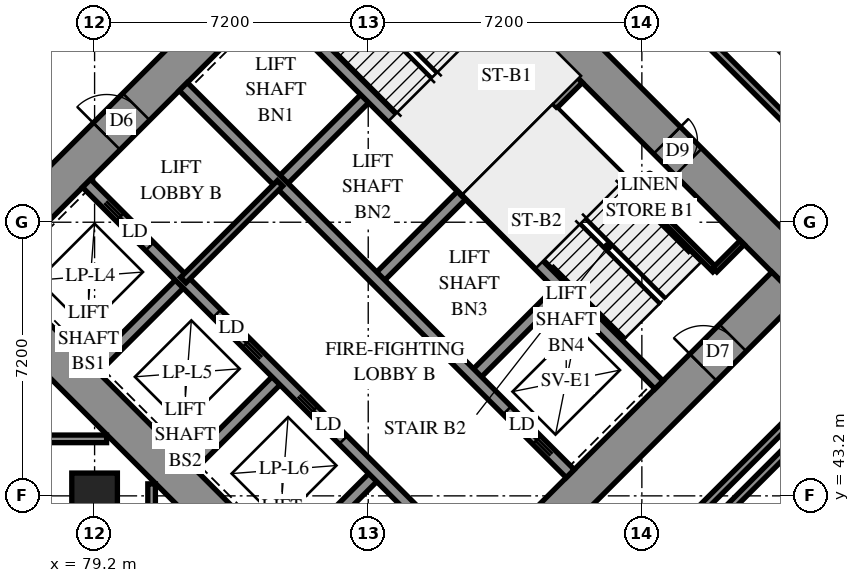
"""IFC4 building model, lengths in metres.
Left out: names, types, materials, properties, quantities, classifications, styles, units other than length and angle.
Written with IfcOpenShell. Run it as: python <this file> out.ifc"""

import sys

from ifc_helpers import new_model, si_unit, direction, frame, frame_2d, origin, origin_2d, place, context, subcontext, project, spatial, polyline, rectangle, outline, extrude, element, fill, save


model = new_model("IFC4")
c1 = context("Model", 3, precision=1e-05, world=origin(), true_north=direction((0.0, 1.0)))
c2 = subcontext(c1, "Body", "Model", "MODEL_VIEW")
j1 = project(units=[si_unit("LENGTHUNIT", "METRE"), si_unit("PLANEANGLEUNIT", "RADIAN")], contexts=[c1])
p1 = place(None, origin())
s1 = spatial("IfcSite", under=j1, at=p1, CompositionType="ELEMENT")
p2 = place(p1, origin())
s2 = spatial("IfcBuilding", under=s1, at=p2, CompositionType="ELEMENT")
p3 = place(p2, frame((0.0, 0.0, 10.2)))
s3 = spatial("IfcBuildingStorey", under=s2, at=p3, CompositionType="ELEMENT", Elevation=10.2)
p4 = place(p3, frame((79.2, 43.2, 0.0), z_axis=(0.0, 0.0, 1.0), x_axis=(1.0, 0.0, 0.0)))
e1 = element("IfcColumn", 1, at=p4, inside=s3, PredefinedType="COLUMN", context=c2, shape_type="SweptSolid", body=[
    extrude(rectangle(XDim=1.2, YDim=1.2, at=origin_2d()), origin(), (0.0, 0.0, 1.0), 3.8),
])
p5 = place(p3, frame((75.594, 49.443, -0.4), z_axis=(0.0, 0.0, 1.0), x_axis=(0.7071037324, -0.70710983, 0.0)))
e2 = element("IfcWall", 2, at=p5, inside=s3, PredefinedType="SHEAR", context=c2, shape_type="SweptSolid", body=[
    extrude(rectangle(XDim=16.4, YDim=1.0, at=frame_2d((8.2, 0.0))), origin(), (0.0, 0.0, 1.0), 3.5),
])
p6 = place(p3, frame((86.483, 60.333, -0.4), z_axis=(0.0, 0.0, 1.0), x_axis=(0.70710983, -0.7071037324, 0.0)))
e3 = element("IfcWall", 3, at=p6, inside=s3, PredefinedType="SHEAR", context=c2, shape_type="SweptSolid", body=[
    extrude(rectangle(XDim=16.4, YDim=1.0, at=frame_2d((8.2, 0.0))), origin(), (0.0, 0.0, 1.0), 3.5),
])
p7 = place(p6, frame((11.0, 0.0, 0.4)))
e4 = element("IfcOpeningElement", 4, at=p7, cuts=e3, PredefinedType="OPENING", context=c2, shape_type="SweptSolid", body=[
    extrude(rectangle(XDim=0.8, YDim=2.1, at=frame_2d((0.4, 1.05))), frame((0.0, 0.51, 0.0), z_axis=(0.0, -1.0, 0.0), x_axis=(1.0, 0.0, 0.0)), (0.0, 0.0, 1.0), 1.02),
])
p8 = place(p3, frame((76.301, 49.443, -0.4), z_axis=(0.0, 0.0, 1.0), x_axis=(0.7071067812, 0.7071067812, 0.0)))
e5 = element("IfcWall", 5, at=p8, inside=s3, PredefinedType="SHEAR", context=c2, shape_type="SweptSolid", body=[
    extrude(rectangle(XDim=14.4, YDim=1.0, at=frame_2d((7.2, 0.0))), origin(), (0.0, 0.0, 1.0), 3.5),
])
p9 = place(p8, frame((4.55, 0.0, 0.4)))
e6 = element("IfcOpeningElement", 6, at=p9, cuts=e5, PredefinedType="OPENING", context=c2, shape_type="SweptSolid", body=[
    extrude(rectangle(XDim=1.1, YDim=2.1, at=frame_2d((0.55, 1.05))), frame((0.0, 0.51, 0.0), z_axis=(0.0, -1.0, 0.0), x_axis=(1.0, 0.0, 0.0)), (0.0, 0.0, 1.0), 1.02),
])
p10 = place(p8, frame((11.35, 0.0, 0.4)))
e7 = element("IfcOpeningElement", 7, at=p10, cuts=e5, PredefinedType="OPENING", context=c2, shape_type="SweptSolid", body=[
    extrude(rectangle(XDim=1.1, YDim=2.1, at=frame_2d((0.55, 1.05))), frame((0.0, 0.51, 0.0), z_axis=(0.0, -1.0, 0.0), x_axis=(1.0, 0.0, 0.0)), (0.0, 0.0, 1.0), 1.02),
])
p11 = place(p3, frame((87.19, 38.554, -0.4), z_axis=(0.0, 0.0, 1.0), x_axis=(0.707103309, 0.7071102534, 0.0)))
e8 = element("IfcWall", 8, at=p11, inside=s3, PredefinedType="SHEAR", context=c2, shape_type="SweptSolid", body=[
    extrude(rectangle(XDim=14.4, YDim=1.0, at=frame_2d((7.2, 0.0))), origin(), (0.0, 0.0, 1.0), 3.5),
])
p12 = place(p11, frame((4.55, 0.0, 0.4)))
e9 = element("IfcOpeningElement", 9, at=p12, cuts=e8, PredefinedType="OPENING", context=c2, shape_type="SweptSolid", body=[
    extrude(rectangle(XDim=1.1, YDim=2.1, at=frame_2d((0.55, 1.05))), frame((0.0, 0.51, 0.0), z_axis=(0.0, -1.0, 0.0), x_axis=(1.0, 0.0, 0.0)), (0.0, 0.0, 1.0), 1.02),
])
p13 = place(p11, frame((11.35, 0.0, 0.4)))
e10 = element("IfcOpeningElement", 10, at=p13, cuts=e8, PredefinedType="OPENING", context=c2, shape_type="SweptSolid", body=[
    extrude(rectangle(XDim=1.1, YDim=2.1, at=frame_2d((0.55, 1.05))), frame((0.0, 0.51, 0.0), z_axis=(0.0, -1.0, 0.0), x_axis=(1.0, 0.0, 0.0)), (0.0, 0.0, 1.0), 1.02),
])
for number, where, z_axis, x_axis in (
    (11, (79.2, 46.544, 0.0), (0.0, 0.0, 1.0), (0.707, 0.707, 0.0)),
    (12, (84.079, 51.423, 0.0), (0.0, 0.0, 1.0), (0.707, 0.707, 0.0)),
):
    element("IfcWall", number, at=place(p3, frame(where, z_axis=z_axis, x_axis=x_axis)), inside=s3, PredefinedType="SOLIDWALL", context=c2, shape_type="SweptSolid", body=[
        extrude(rectangle(XDim=3.3, YDim=0.3, at=frame_2d((1.65, 0.0))), origin(), (0.0, 0.0, 1.0), 3.8),
    ])
p14 = place(p3, frame((81.746, 43.999, 0.0), z_axis=(0.0, 0.0, 1.0), x_axis=(0.7071067812, 0.7071067812, 0.0)))
e13 = element("IfcWall", 13, at=p14, inside=s3, PredefinedType="SOLIDWALL", context=c2, shape_type="SweptSolid", body=[
    extrude(rectangle(XDim=3.3, YDim=0.3, at=frame_2d((1.65, 0.0))), origin(), (0.0, 0.0, 1.0), 3.8),
])
p15 = place(p3, frame((86.625, 48.878, 0.0), z_axis=(0.0, 0.0, 1.0), x_axis=(0.7071067812, 0.7071067812, 0.0)))
e14 = element("IfcWall", 14, at=p15, inside=s3, PredefinedType="SOLIDWALL", context=c2, shape_type="SweptSolid", body=[
    extrude(rectangle(XDim=3.3, YDim=0.3, at=frame_2d((1.65, 0.0))), origin(), (0.0, 0.0, 1.0), 3.8),
])
p16 = place(p3, frame((84.291, 41.453, 0.0), z_axis=(0.0, 0.0, 1.0), x_axis=(0.7071067812, 0.7071067812, 0.0)))
e15 = element("IfcWall", 15, at=p16, inside=s3, PredefinedType="SOLIDWALL", context=c2, shape_type="SweptSolid", body=[
    extrude(rectangle(XDim=3.3, YDim=0.3, at=frame_2d((1.65, 0.0))), origin(), (0.0, 0.0, 1.0), 3.8),
])
p17 = place(p3, frame((89.17, 46.332, 0.0), z_axis=(0.0, 0.0, 1.0), x_axis=(0.7071067812, 0.7071067812, 0.0)))
e16 = element("IfcWall", 16, at=p17, inside=s3, PredefinedType="SOLIDWALL", context=c2, shape_type="SweptSolid", body=[
    extrude(rectangle(XDim=3.3, YDim=0.3, at=frame_2d((1.65, 0.0))), origin(), (0.0, 0.0, 1.0), 3.8),
])
p18 = place(p3, frame((78.988, 51.423, 0.0), z_axis=(0.0, 0.0, 1.0), x_axis=(0.7071067812, -0.7071067812, 0.0)))
e17 = element("IfcWall", 17, at=p18, inside=s3, PredefinedType="SOLIDWALL", context=c2, shape_type="SweptSolid", body=[
    extrude(rectangle(XDim=14.4, YDim=0.3, at=frame_2d((7.2, 0.0))), origin(), (0.0, 0.0, 1.0), 3.8),
])
p19 = place(p18, frame((1.25, 0.0, 0.0)))
e18 = element("IfcOpeningElement", 18, at=p19, cuts=e17, PredefinedType="OPENING", context=c2, shape_type="SweptSolid", body=[
    extrude(rectangle(XDim=1.1, YDim=2.1, at=frame_2d((0.55, 1.05))), frame((0.0, 0.16, 0.0), z_axis=(0.0, -1.0, 0.0), x_axis=(1.0, 0.0, 0.0)), (0.0, 0.0, 1.0), 0.32),
])
p20 = place(p18, frame((4.85, 0.0, 0.0)))
e19 = element("IfcOpeningElement", 19, at=p20, cuts=e17, PredefinedType="OPENING", context=c2, shape_type="SweptSolid", body=[
    extrude(rectangle(XDim=1.1, YDim=2.1, at=frame_2d((0.55, 1.05))), frame((0.0, 0.16, 0.0), z_axis=(0.0, -1.0, 0.0), x_axis=(1.0, 0.0, 0.0)), (0.0, 0.0, 1.0), 0.32),
])
p21 = place(p18, frame((8.45, 0.0, 0.0)))
e20 = element("IfcOpeningElement", 20, at=p21, cuts=e17, PredefinedType="OPENING", context=c2, shape_type="SweptSolid", body=[
    extrude(rectangle(XDim=1.1, YDim=2.1, at=frame_2d((0.55, 1.05))), frame((0.0, 0.16, 0.0), z_axis=(0.0, -1.0, 0.0), x_axis=(1.0, 0.0, 0.0)), (0.0, 0.0, 1.0), 0.32),
])
p22 = place(p18, frame((12.05, 0.0, 0.0)))
e21 = element("IfcOpeningElement", 21, at=p22, cuts=e17, PredefinedType="OPENING", context=c2, shape_type="SweptSolid", body=[
    extrude(rectangle(XDim=1.1, YDim=2.1, at=frame_2d((0.55, 1.05))), frame((0.0, 0.16, 0.0), z_axis=(0.0, -1.0, 0.0), x_axis=(1.0, 0.0, 0.0)), (0.0, 0.0, 1.0), 0.32),
])
p23 = place(p3, frame((81.534, 53.969, 0.0), z_axis=(0.0, 0.0, 1.0), x_axis=(0.707103309, -0.7071102534, 0.0)))
e22 = element("IfcWall", 22, at=p23, inside=s3, PredefinedType="SOLIDWALL", context=c2, shape_type="SweptSolid", body=[
    extrude(rectangle(XDim=14.4, YDim=0.3, at=frame_2d((7.2, 0.0))), origin(), (0.0, 0.0, 1.0), 3.8),
])
p24 = place(p23, frame((12.05, 0.0, 0.0)))
e23 = element("IfcOpeningElement", 23, at=p24, cuts=e22, PredefinedType="OPENING", context=c2, shape_type="SweptSolid", body=[
    extrude(rectangle(XDim=1.1, YDim=2.1, at=frame_2d((0.55, 1.05))), frame((0.0, 0.16, 0.0), z_axis=(0.0, -1.0, 0.0), x_axis=(1.0, 0.0, 0.0)), (0.0, 0.0, 1.0), 0.32),
])
for number, where, z_axis, x_axis in (
    (24, (83.867, 56.302, 0.0), (0.0, 0.0, 1.0), (0.707, -0.707, 0.0)),
    (25, (88.958, 51.211, 0.0), (0.0, 0.0, 1.0), (0.707, -0.707, 0.0)),
):
    element("IfcWall", number, at=place(p3, frame(where, z_axis=z_axis, x_axis=x_axis)), inside=s3, PredefinedType="SOLIDWALL", context=c2, shape_type="SweptSolid", body=[
        extrude(rectangle(XDim=7.2, YDim=0.3, at=frame_2d((3.6, 0.0))), origin(), (0.0, 0.0, 1.0), 3.8),
    ])
p25 = place(p3, frame((88.958, 51.211, 0.0), z_axis=(0.0, 0.0, 1.0), x_axis=(0.7071067812, 0.7071067812, 0.0)))
e26 = element("IfcWall", 26, at=p25, inside=s3, PredefinedType="SOLIDWALL", context=c2, shape_type="SweptSolid", body=[
    extrude(rectangle(XDim=4.2, YDim=0.3, at=frame_2d((2.1, 0.0))), origin(), (0.0, 0.0, 1.0), 3.8),
])
p26 = place(p3, frame((117.843, 34.665, 0.0), z_axis=(0.0, 0.0, 1.0), x_axis=(-0.7071067812, 0.7071067812, 0.0)))
e27 = element("IfcWall", 27, at=p26, inside=s3, PredefinedType="SOLIDWALL", context=c2, shape_type="SweptSolid", body=[
    extrude(outline(polyline([(-0.275, -0.275), (54.222, -0.275), (53.994, 0.275), (0.275, 0.275), (-0.275, -0.275)])), origin(), (0.0, 0.0, 1.0), 3.8),
])
p27 = place(p26, frame((0.8, 0.0, 0.7)))
e28 = element("IfcOpeningElement", 28, at=p27, cuts=e27, PredefinedType="OPENING", context=c2, shape_type="SweptSolid", body=[
    extrude(rectangle(XDim=1.8, YDim=2.6, at=frame_2d((0.9, 1.3))), frame((0.0, 0.285, 0.0), z_axis=(0.0, -1.0, 0.0), x_axis=(1.0, 0.0, 0.0)), (0.0, 0.0, 1.0), 0.57),
])
p28 = place(p26, frame((4.225, 0.0, 0.7)))
e29 = element("IfcOpeningElement", 29, at=p28, cuts=e27, PredefinedType="OPENING", context=c2, shape_type="SweptSolid", body=[
    extrude(rectangle(XDim=1.8, YDim=2.6, at=frame_2d((0.9, 1.3))), frame((0.0, 0.285, 0.0), z_axis=(0.0, -1.0, 0.0), x_axis=(1.0, 0.0, 0.0)), (0.0, 0.0, 1.0), 0.57),
])
p29 = place(p26, frame((7.825, 0.0, 0.7)))
e30 = element("IfcOpeningElement", 30, at=p29, cuts=e27, PredefinedType="OPENING", context=c2, shape_type="SweptSolid", body=[
    extrude(rectangle(XDim=1.8, YDim=2.6, at=frame_2d((0.9, 1.3))), frame((0.0, 0.285, 0.0), z_axis=(0.0, -1.0, 0.0), x_axis=(1.0, 0.0, 0.0)), (0.0, 0.0, 1.0), 0.57),
])
p30 = place(p26, frame((11.425, 0.0, 0.7)))
e31 = element("IfcOpeningElement", 31, at=p30, cuts=e27, PredefinedType="OPENING", context=c2, shape_type="SweptSolid", body=[
    extrude(rectangle(XDim=1.8, YDim=2.6, at=frame_2d((0.9, 1.3))), frame((0.0, 0.285, 0.0), z_axis=(0.0, -1.0, 0.0), x_axis=(1.0, 0.0, 0.0)), (0.0, 0.0, 1.0), 0.57),
])
p31 = place(p26, frame((15.025, 0.0, 0.7)))
e32 = element("IfcOpeningElement", 32, at=p31, cuts=e27, PredefinedType="OPENING", context=c2, shape_type="SweptSolid", body=[
    extrude(rectangle(XDim=1.8, YDim=2.6, at=frame_2d((0.9, 1.3))), frame((0.0, 0.285, 0.0), z_axis=(0.0, -1.0, 0.0), x_axis=(1.0, 0.0, 0.0)), (0.0, 0.0, 1.0), 0.57),
])
p32 = place(p26, frame((18.625, 0.0, 0.7)))
e33 = element("IfcOpeningElement", 33, at=p32, cuts=e27, PredefinedType="OPENING", context=c2, shape_type="SweptSolid", body=[
    extrude(rectangle(XDim=1.8, YDim=2.6, at=frame_2d((0.9, 1.3))), frame((0.0, 0.285, 0.0), z_axis=(0.0, -1.0, 0.0), x_axis=(1.0, 0.0, 0.0)), (0.0, 0.0, 1.0), 0.57),
])
p33 = place(p26, frame((22.225, 0.0, 0.7)))
e34 = element("IfcOpeningElement", 34, at=p33, cuts=e27, PredefinedType="OPENING", context=c2, shape_type="SweptSolid", body=[
    extrude(rectangle(XDim=1.8, YDim=2.6, at=frame_2d((0.9, 1.3))), frame((0.0, 0.285, 0.0), z_axis=(0.0, -1.0, 0.0), x_axis=(1.0, 0.0, 0.0)), (0.0, 0.0, 1.0), 0.57),
])
p34 = place(p26, frame((25.825, 0.0, 0.7)))
e35 = element("IfcOpeningElement", 35, at=p34, cuts=e27, PredefinedType="OPENING", context=c2, shape_type="SweptSolid", body=[
    extrude(rectangle(XDim=1.8, YDim=2.6, at=frame_2d((0.9, 1.3))), frame((0.0, 0.285, 0.0), z_axis=(0.0, -1.0, 0.0), x_axis=(1.0, 0.0, 0.0)), (0.0, 0.0, 1.0), 0.57),
])
p35 = place(p26, frame((29.425, 0.0, 0.7)))
e36 = element("IfcOpeningElement", 36, at=p35, cuts=e27, PredefinedType="OPENING", context=c2, shape_type="SweptSolid", body=[
    extrude(rectangle(XDim=1.8, YDim=2.6, at=frame_2d((0.9, 1.3))), frame((0.0, 0.285, 0.0), z_axis=(0.0, -1.0, 0.0), x_axis=(1.0, 0.0, 0.0)), (0.0, 0.0, 1.0), 0.57),
])
p36 = place(p26, frame((33.025, 0.0, 0.7)))
e37 = element("IfcOpeningElement", 37, at=p36, cuts=e27, PredefinedType="OPENING", context=c2, shape_type="SweptSolid", body=[
    extrude(rectangle(XDim=1.8, YDim=2.6, at=frame_2d((0.9, 1.3))), frame((0.0, 0.285, 0.0), z_axis=(0.0, -1.0, 0.0), x_axis=(1.0, 0.0, 0.0)), (0.0, 0.0, 1.0), 0.57),
])
p37 = place(p26, frame((36.625, 0.0, 0.7)))
e38 = element("IfcOpeningElement", 38, at=p37, cuts=e27, PredefinedType="OPENING", context=c2, shape_type="SweptSolid", body=[
    extrude(rectangle(XDim=1.8, YDim=2.6, at=frame_2d((0.9, 1.3))), frame((0.0, 0.285, 0.0), z_axis=(0.0, -1.0, 0.0), x_axis=(1.0, 0.0, 0.0)), (0.0, 0.0, 1.0), 0.57),
])
p38 = place(p26, frame((40.225, 0.0, 0.7)))
e39 = element("IfcOpeningElement", 39, at=p38, cuts=e27, PredefinedType="OPENING", context=c2, shape_type="SweptSolid", body=[
    extrude(rectangle(XDim=1.8, YDim=2.6, at=frame_2d((0.9, 1.3))), frame((0.0, 0.285, 0.0), z_axis=(0.0, -1.0, 0.0), x_axis=(1.0, 0.0, 0.0)), (0.0, 0.0, 1.0), 0.57),
])
p39 = place(p26, frame((43.825, 0.0, 0.7)))
e40 = element("IfcOpeningElement", 40, at=p39, cuts=e27, PredefinedType="OPENING", context=c2, shape_type="SweptSolid", body=[
    extrude(rectangle(XDim=1.8, YDim=2.6, at=frame_2d((0.9, 1.3))), frame((0.0, 0.285, 0.0), z_axis=(0.0, -1.0, 0.0), x_axis=(1.0, 0.0, 0.0)), (0.0, 0.0, 1.0), 0.57),
])
p40 = place(p26, frame((47.425, 0.0, 0.7)))
e41 = element("IfcOpeningElement", 41, at=p40, cuts=e27, PredefinedType="OPENING", context=c2, shape_type="SweptSolid", body=[
    extrude(rectangle(XDim=1.8, YDim=2.6, at=frame_2d((0.9, 1.3))), frame((0.0, 0.285, 0.0), z_axis=(0.0, -1.0, 0.0), x_axis=(1.0, 0.0, 0.0)), (0.0, 0.0, 1.0), 0.57),
])
p41 = place(p26, frame((50.96, 0.0, 0.7)))
e42 = element("IfcOpeningElement", 42, at=p41, cuts=e27, PredefinedType="OPENING", context=c2, shape_type="SweptSolid", body=[
    extrude(rectangle(XDim=1.8, YDim=2.6, at=frame_2d((0.9, 1.3))), frame((0.0, 0.285, 0.0), z_axis=(0.0, -1.0, 0.0), x_axis=(1.0, 0.0, 0.0)), (0.0, 0.0, 1.0), 0.57),
])
p42 = place(p3, frame((91.313, 53.354, 0.0), z_axis=(0.0, 0.0, 1.0), x_axis=(0.7071067812, -0.7071067812, 0.0)))
e43 = element("IfcWall", 43, at=p42, inside=s3, PredefinedType="PARTITIONING", context=c2, shape_type="SweptSolid", body=[
    extrude(rectangle(XDim=5.95, YDim=0.15, at=frame_2d((2.975, 0.0))), origin(), (0.0, 0.0, 1.0), 3.8),
])
p43 = place(p3, frame((95.52, 49.146, 0.0), z_axis=(0.0, 0.0, 1.0), x_axis=(0.7071067812, 0.7071067812, 0.0)))
e44 = element("IfcWall", 44, at=p43, inside=s3, PredefinedType="PARTITIONING", context=c2, shape_type="SweptSolid", body=[
    extrude(rectangle(XDim=1.02, YDim=0.15, at=frame_2d((0.51, 0.0))), origin(), (0.0, 0.0, 1.0), 3.8),
])
p44 = place(p3, frame((81.534, 48.878, 0.0), z_axis=(0.0, 0.0, 1.0), x_axis=(0.707092892, 0.7071206701, 0.0)))
e45 = element("IfcWall", 45, at=p44, inside=s3, PredefinedType="PARTITIONING", context=c2, shape_type="SweptSolid", body=[
    extrude(rectangle(XDim=3.6, YDim=0.2, at=frame_2d((1.8, 0.0))), origin(), (0.0, 0.0, 1.0), 3.8),
])
p45 = place(p3, frame((95.215, 42.197, 0.0), z_axis=(0.0, 0.0, 1.0), x_axis=(0.707111589, 0.7071019733, 0.0)))
e46 = element("IfcWall", 46, at=p45, inside=s3, PredefinedType="PARTITIONING", context=c2, shape_type="SweptSolid", body=[
    extrude(rectangle(XDim=10.4, YDim=0.2, at=frame_2d((5.2, 0.0))), origin(), (0.0, 0.0, 1.0), 3.8),
])
p46 = place(p3, frame((94.863, 42.551, 0.0), z_axis=(0.0, 0.0, 1.0), x_axis=(0.7071067812, 0.7071067812, 0.0)))
e47 = element("IfcWall", 47, at=p46, inside=s3, PredefinedType="PARTITIONING", context=c2, shape_type="SweptSolid", body=[
    extrude(rectangle(XDim=9.249, YDim=0.2, at=frame_2d((4.625, 0.0))), origin(), (0.0, 0.0, 1.0), 3.8),
])
p47 = place(p3, frame((94.363, 56.123, 0.0), z_axis=(0.0, 0.0, 1.0), x_axis=(0.7071067812, -0.7071067812, 0.0)))
e48 = element("IfcWall", 48, at=p47, inside=s3, PredefinedType="PARTITIONING", context=c2, shape_type="SweptSolid", body=[
    extrude(rectangle(XDim=6.503, YDim=0.2, at=frame_2d((3.251, 0.0))), origin(), (0.0, 0.0, 1.0), 3.8),
])
for number, where, z_axis, x_axis in (
    (49, (77.702, 44.7, 0.0), (0.0, 0.0, 1.0), (1.0, 0.0, 0.0)),
    (50, (80.7, 41.702, 0.0), (0.0, 0.0, 1.0), (0.0, 1.0, 0.0)),
):
    element("IfcWall", number, at=place(p3, frame(where, z_axis=z_axis, x_axis=x_axis)), inside=s3, PredefinedType="PARTITIONING", context=c2, shape_type="SweptSolid", body=[
        extrude(rectangle(XDim=1.814, YDim=0.2, at=frame_2d((0.907, 0.0))), origin(), (0.0, 0.0, 1.0), 3.8),
    ])
p48 = place(p7, origin())
e51 = element("IfcDoor", 51, at=p48, inside=s3, OperationType="SINGLE_SWING_RIGHT", PredefinedType="DOOR", context=c2, shape_type="SweptSolid", body=[
    extrude(rectangle(XDim=0.8, YDim=2.1, at=frame_2d((0.4, 1.05))), frame((0.0, -0.44, 0.0), z_axis=(0.0, -1.0, 0.0), x_axis=(1.0, 0.0, 0.0)), (0.0, 0.0, 1.0), 0.05),
])
fill(e4, e51)
p49 = place(p9, origin())
e52 = element("IfcDoor", 52, at=p49, inside=s3, OperationType="DOUBLE_DOOR_SINGLE_SWING", PredefinedType="DOOR", context=c2, shape_type="SweptSolid", body=[
    extrude(rectangle(XDim=1.1, YDim=2.1, at=frame_2d((0.55, 1.05))), frame((0.0, 0.025, 0.0), z_axis=(0.0, -1.0, 0.0), x_axis=(1.0, 0.0, 0.0)), (0.0, 0.0, 1.0), 0.05),
])
fill(e6, e52)
p50 = place(p13, origin())
e53 = element("IfcDoor", 53, at=p50, inside=s3, OperationType="SINGLE_SWING_RIGHT", PredefinedType="DOOR", context=c2, shape_type="SweptSolid", body=[
    extrude(rectangle(XDim=1.1, YDim=2.1, at=frame_2d((0.55, 1.05))), frame((0.0, 0.025, 0.0), z_axis=(0.0, -1.0, 0.0), x_axis=(1.0, 0.0, 0.0)), (0.0, 0.0, 1.0), 0.05),
])
fill(e10, e53)
p51 = place(p19, origin())
e54 = element("IfcDoor", 54, at=p51, inside=s3, OperationType="SLIDING_TO_LEFT", PredefinedType="DOOR", context=c2, shape_type="SweptSolid", body=[
    extrude(rectangle(XDim=1.1, YDim=2.1, at=frame_2d((0.55, 1.05))), frame((0.0, 0.025, 0.0), z_axis=(0.0, -1.0, 0.0), x_axis=(1.0, 0.0, 0.0)), (0.0, 0.0, 1.0), 0.05),
])
fill(e18, e54)
p52 = place(p20, origin())
e55 = element("IfcDoor", 55, at=p52, inside=s3, OperationType="SLIDING_TO_RIGHT", PredefinedType="DOOR", context=c2, shape_type="SweptSolid", body=[
    extrude(rectangle(XDim=1.1, YDim=2.1, at=frame_2d((0.55, 1.05))), frame((0.0, 0.025, 0.0), z_axis=(0.0, -1.0, 0.0), x_axis=(1.0, 0.0, 0.0)), (0.0, 0.0, 1.0), 0.05),
])
fill(e19, e55)
p53 = place(p21, origin())
e56 = element("IfcDoor", 56, at=p53, inside=s3, OperationType="SLIDING_TO_LEFT", PredefinedType="DOOR", context=c2, shape_type="SweptSolid", body=[
    extrude(rectangle(XDim=1.1, YDim=2.1, at=frame_2d((0.55, 1.05))), frame((0.0, 0.025, 0.0), z_axis=(0.0, -1.0, 0.0), x_axis=(1.0, 0.0, 0.0)), (0.0, 0.0, 1.0), 0.05),
])
fill(e20, e56)
p54 = place(p24, origin())
e57 = element("IfcDoor", 57, at=p54, inside=s3, OperationType="SLIDING_TO_RIGHT", PredefinedType="DOOR", context=c2, shape_type="SweptSolid", body=[
    extrude(rectangle(XDim=1.1, YDim=2.1, at=frame_2d((0.55, 1.05))), frame((0.0, 0.025, 0.0), z_axis=(0.0, -1.0, 0.0), x_axis=(1.0, 0.0, 0.0)), (0.0, 0.0, 1.0), 0.05),
])
fill(e23, e57)
save(model, sys.argv[1])
